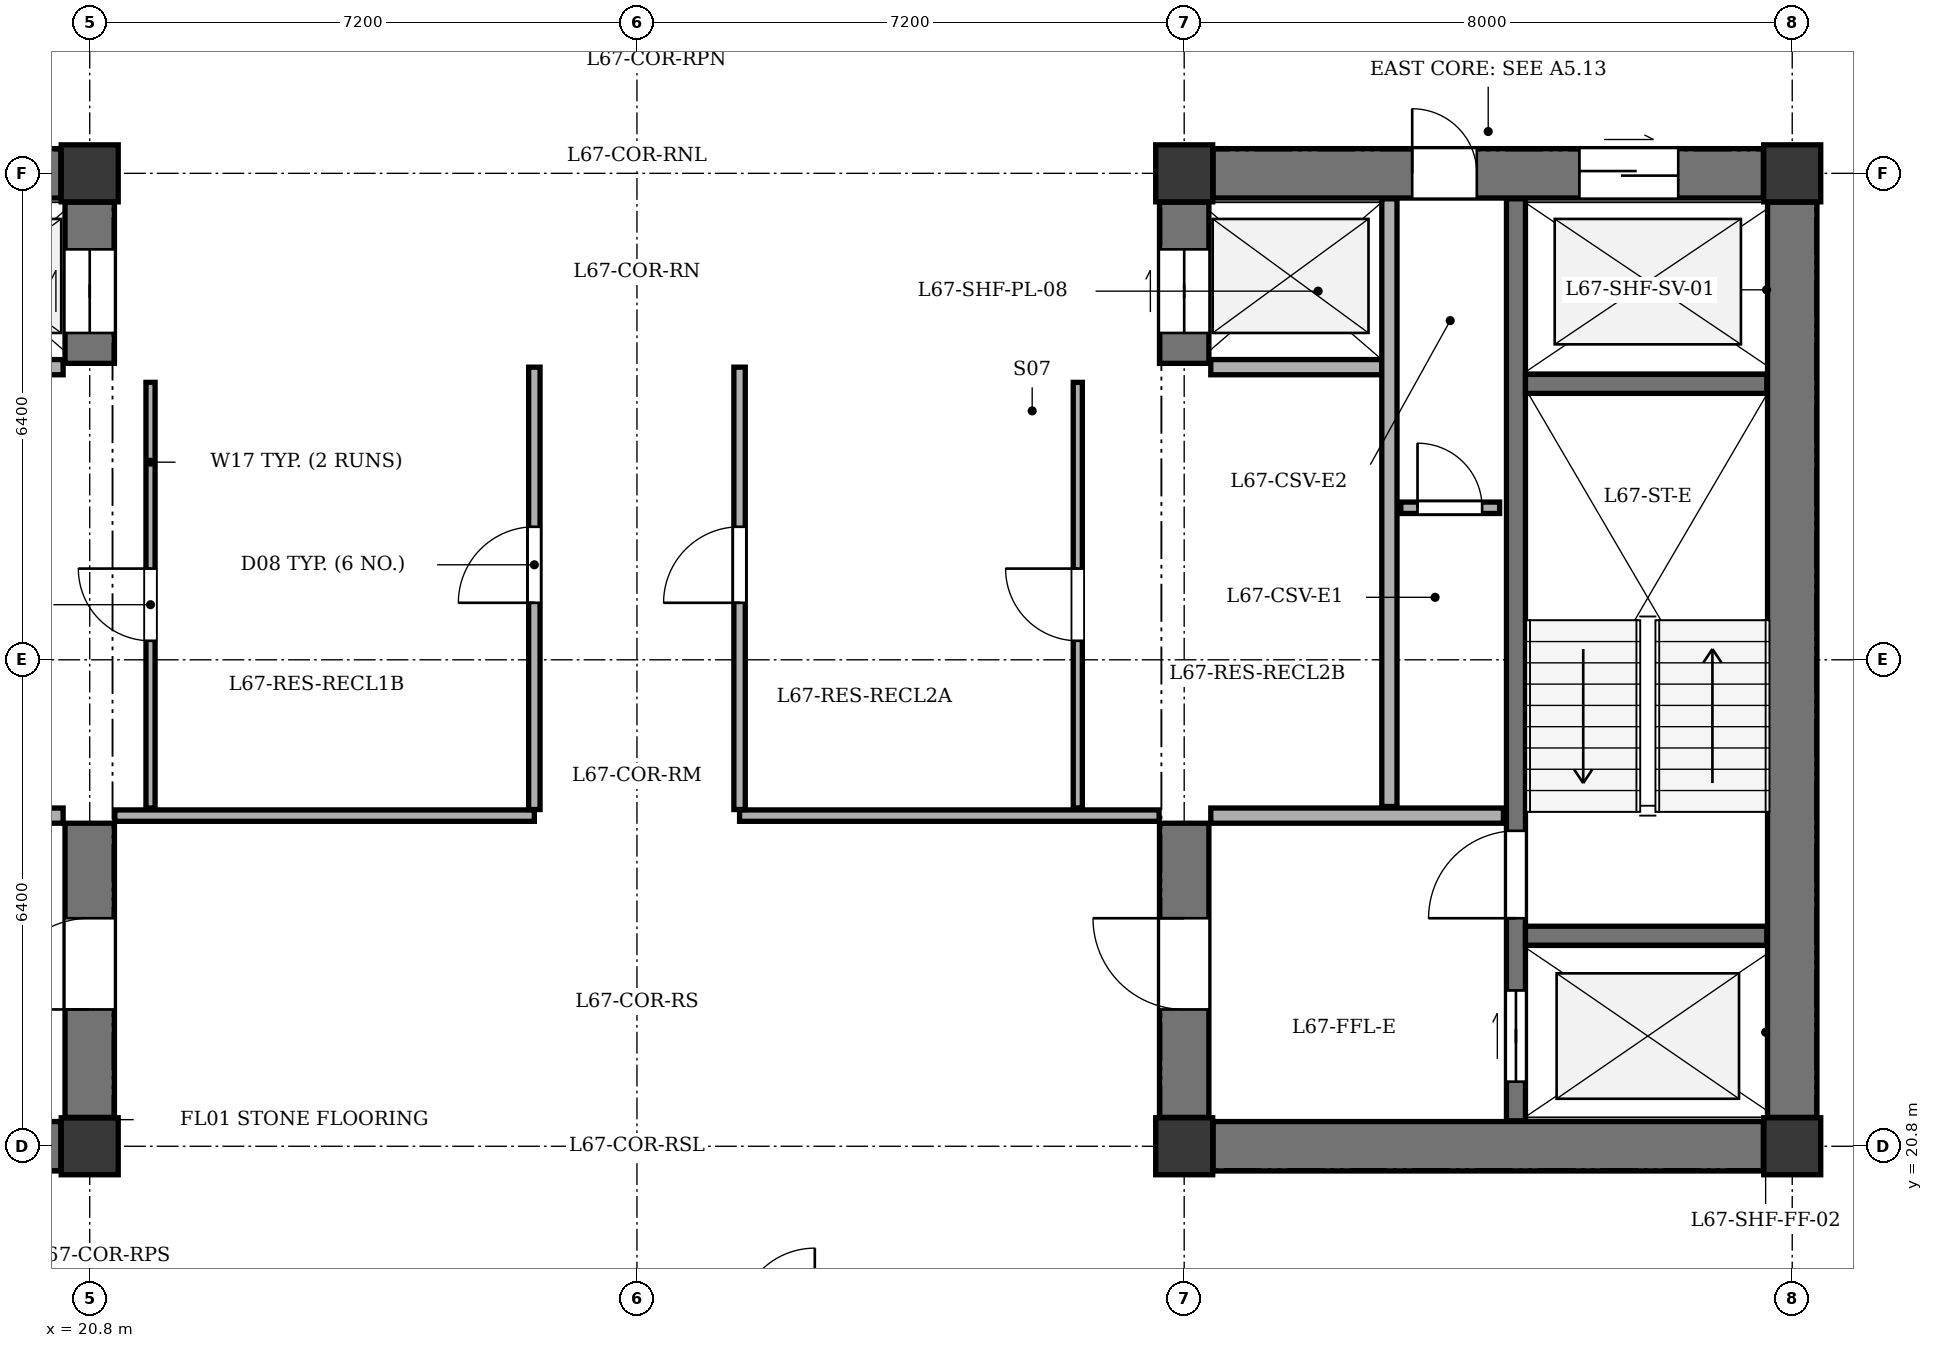
"""IFC4 building model, lengths in metres.
Left out: names, types, materials, properties, quantities, classifications, styles, units other than length and angle.
Written with IfcOpenShell. Run it as: python <this file> out.ifc"""

import sys

from ifc_helpers import new_model, si_unit, direction, frame, frame_2d, origin, origin_2d, place, context, subcontext, project, spatial, rectangle, extrude, element, fill, save


model = new_model("IFC4")
c1 = context("Model", 3, precision=1e-05, world=origin(), true_north=direction((0.0, 1.0)))
c2 = subcontext(c1, "Body", "Model", "MODEL_VIEW")
j1 = project(units=[si_unit("LENGTHUNIT", "METRE"), si_unit("PLANEANGLEUNIT", "RADIAN")], contexts=[c1])
p1 = place(None, origin())
s1 = spatial("IfcSite", under=j1, at=p1, CompositionType="ELEMENT")
p2 = place(p1, origin())
s2 = spatial("IfcBuilding", under=s1, at=p2, CompositionType="ELEMENT")
p3 = place(p2, frame((0.0, 0.0, 255.1)))
s3 = spatial("IfcBuildingStorey", under=s2, at=p3, CompositionType="ELEMENT", Elevation=255.1)
for number, where, z_axis, x_axis in (
    (1, (20.8, 20.8, 0.0), (0.0, 0.0, 1.0), (1.0, 0.0, 0.0)),
    (2, (20.8, 33.6, 0.0), (0.0, 0.0, 1.0), (1.0, 0.0, 0.0)),
    (3, (35.2, 20.8, 0.0), (0.0, 0.0, 1.0), (1.0, 0.0, 0.0)),
    (4, (43.2, 20.8, 0.0), (0.0, 0.0, 1.0), (1.0, 0.0, 0.0)),
    (5, (35.2, 33.6, 0.0), (0.0, 0.0, 1.0), (1.0, 0.0, 0.0)),
    (6, (43.2, 33.6, 0.0), (0.0, 0.0, 1.0), (1.0, 0.0, 0.0)),
):
    element("IfcColumn", number, at=place(p3, frame(where, z_axis=z_axis, x_axis=x_axis)), inside=s3, PredefinedType="COLUMN", context=c2, shape_type="SweptSolid", body=[
        extrude(rectangle(XDim=0.75, YDim=0.75, at=origin_2d()), origin(), (0.0, 0.0, 1.0), 3.4),
    ])
p4 = place(p3, frame((13.18, 20.8, 0.0), z_axis=(0.0, 0.0, 1.0), x_axis=(1.0, 0.0, 0.0)))
e7 = element("IfcWall", 7, at=p4, inside=s3, PredefinedType="SHEAR", context=c2, shape_type="SweptSolid", body=[
    extrude(rectangle(XDim=7.24, YDim=0.65, at=frame_2d((3.62, 0.0))), origin(), (0.0, 0.0, 1.0), 3.1),
])
p5 = place(p3, frame((13.18, 33.6, 0.0), z_axis=(0.0, 0.0, 1.0), x_axis=(1.0, 0.0, 0.0)))
e8 = element("IfcWall", 8, at=p5, inside=s3, PredefinedType="SHEAR", context=c2, shape_type="SweptSolid", body=[
    extrude(rectangle(XDim=7.24, YDim=0.65, at=frame_2d((3.62, 0.0))), origin(), (0.0, 0.0, 1.0), 3.1),
])
p6 = place(p5, frame((2.19, 0.0, 0.0)))
e9 = element("IfcOpeningElement", 9, at=p6, cuts=e8, PredefinedType="OPENING", context=c2, shape_type="SweptSolid", body=[
    extrude(rectangle(XDim=0.85, YDim=2.02, at=frame_2d((0.425, 1.01))), frame((0.0, 0.335, 0.0), z_axis=(0.0, -1.0, 0.0), x_axis=(1.0, 0.0, 0.0)), (0.0, 0.0, 1.0), 0.67),
])
p7 = place(p3, frame((20.8, 21.18, 0.0), z_axis=(0.0, 0.0, 1.0), x_axis=(0.0, 1.0, 0.0)))
e10 = element("IfcWall", 10, at=p7, inside=s3, PredefinedType="SHEAR", context=c2, shape_type="SweptSolid", body=[
    extrude(rectangle(XDim=3.87, YDim=0.65, at=frame_2d((1.935, 0.0))), origin(), (0.0, 0.0, 1.0), 3.1),
])
p8 = place(p7, frame((1.42, 0.0, 0.0)))
e11 = element("IfcOpeningElement", 11, at=p8, cuts=e10, PredefinedType="OPENING", context=c2, shape_type="SweptSolid", body=[
    extrude(rectangle(XDim=1.2, YDim=2.15, at=frame_2d((0.6, 1.075))), frame((0.0, 0.335, 0.0), z_axis=(0.0, -1.0, 0.0), x_axis=(1.0, 0.0, 0.0)), (0.0, 0.0, 1.0), 0.67),
])
p9 = place(p3, frame((20.8, 31.1, 0.0), z_axis=(0.0, 0.0, 1.0), x_axis=(0.0, 1.0, 0.0)))
e12 = element("IfcWall", 12, at=p9, inside=s3, PredefinedType="SHEAR", context=c2, shape_type="SweptSolid", body=[
    extrude(rectangle(XDim=2.12, YDim=0.65, at=frame_2d((1.06, 0.0))), origin(), (0.0, 0.0, 1.0), 3.1),
])
p10 = place(p9, frame((0.4, 0.0, 0.0)))
e13 = element("IfcOpeningElement", 13, at=p10, cuts=e12, PredefinedType="OPENING", context=c2, shape_type="SweptSolid", body=[
    extrude(rectangle(XDim=1.1, YDim=2.1, at=frame_2d((0.55, 1.05))), frame((0.0, 0.335, 0.0), z_axis=(0.0, -1.0, 0.0), x_axis=(1.0, 0.0, 0.0)), (0.0, 0.0, 1.0), 0.67),
])
for number, where, z_axis, x_axis in (
    (14, (16.6, 25.15, 0.0), (0.0, 0.0, 1.0), (1.0, 0.0, 0.0)),
    (15, (16.6, 31.05, 0.0), (0.0, 0.0, 1.0), (1.0, 0.0, 0.0)),
):
    element("IfcWall", number, at=place(p3, frame(where, z_axis=z_axis, x_axis=x_axis)), inside=s3, PredefinedType="SOLIDWALL", context=c2, shape_type="SweptSolid", body=[
        extrude(rectangle(XDim=3.85, YDim=0.2, at=frame_2d((1.925, 0.0))), origin(), (0.0, 0.0, 1.0), 3.1),
    ])
p11 = place(p3, frame((43.2, 21.18, 0.0), z_axis=(0.0, 0.0, 1.0), x_axis=(0.0, 1.0, 0.0)))
e16 = element("IfcWall", 16, at=p11, inside=s3, PredefinedType="SHEAR", context=c2, shape_type="SweptSolid", body=[
    extrude(rectangle(XDim=12.04, YDim=0.65, at=frame_2d((6.02, 0.0))), origin(), (0.0, 0.0, 1.0), 3.1),
])
p12 = place(p3, frame((35.58, 20.8, 0.0), z_axis=(0.0, 0.0, 1.0), x_axis=(1.0, 0.0, 0.0)))
e17 = element("IfcWall", 17, at=p12, inside=s3, PredefinedType="SHEAR", context=c2, shape_type="SweptSolid", body=[
    extrude(rectangle(XDim=7.24, YDim=0.65, at=frame_2d((3.62, 0.0))), origin(), (0.0, 0.0, 1.0), 3.1),
])
p13 = place(p3, frame((35.58, 33.6, 0.0), z_axis=(0.0, 0.0, 1.0), x_axis=(1.0, 0.0, 0.0)))
e18 = element("IfcWall", 18, at=p13, inside=s3, PredefinedType="SHEAR", context=c2, shape_type="SweptSolid", body=[
    extrude(rectangle(XDim=7.24, YDim=0.65, at=frame_2d((3.62, 0.0))), origin(), (0.0, 0.0, 1.0), 3.1),
])
p14 = place(p13, frame((4.82, 0.0, 0.0)))
e19 = element("IfcOpeningElement", 19, at=p14, cuts=e18, PredefinedType="OPENING", context=c2, shape_type="SweptSolid", body=[
    extrude(rectangle(XDim=1.3, YDim=2.15, at=frame_2d((0.65, 1.075))), frame((0.0, 0.335, 0.0), z_axis=(0.0, -1.0, 0.0), x_axis=(1.0, 0.0, 0.0)), (0.0, 0.0, 1.0), 0.67),
])
p15 = place(p13, frame((2.62, 0.0, 0.0)))
e20 = element("IfcOpeningElement", 20, at=p15, cuts=e18, PredefinedType="OPENING", context=c2, shape_type="SweptSolid", body=[
    extrude(rectangle(XDim=0.85, YDim=2.02, at=frame_2d((0.425, 1.01))), frame((0.0, 0.335, 0.0), z_axis=(0.0, -1.0, 0.0), x_axis=(1.0, 0.0, 0.0)), (0.0, 0.0, 1.0), 0.67),
])
p16 = place(p3, frame((35.2, 21.18, 0.0), z_axis=(0.0, 0.0, 1.0), x_axis=(0.0, 1.0, 0.0)))
e21 = element("IfcWall", 21, at=p16, inside=s3, PredefinedType="SHEAR", context=c2, shape_type="SweptSolid", body=[
    extrude(rectangle(XDim=3.87, YDim=0.65, at=frame_2d((1.935, 0.0))), origin(), (0.0, 0.0, 1.0), 3.1),
])
p17 = place(p16, frame((1.42, 0.0, 0.0)))
e22 = element("IfcOpeningElement", 22, at=p17, cuts=e21, PredefinedType="OPENING", context=c2, shape_type="SweptSolid", body=[
    extrude(rectangle(XDim=1.2, YDim=2.15, at=frame_2d((0.6, 1.075))), frame((0.0, 0.335, 0.0), z_axis=(0.0, -1.0, 0.0), x_axis=(1.0, 0.0, 0.0)), (0.0, 0.0, 1.0), 0.67),
])
p18 = place(p3, frame((35.2, 31.1, 0.0), z_axis=(0.0, 0.0, 1.0), x_axis=(0.0, 1.0, 0.0)))
e23 = element("IfcWall", 23, at=p18, inside=s3, PredefinedType="SHEAR", context=c2, shape_type="SweptSolid", body=[
    extrude(rectangle(XDim=2.12, YDim=0.65, at=frame_2d((1.06, 0.0))), origin(), (0.0, 0.0, 1.0), 3.1),
])
p19 = place(p18, frame((0.4, 0.0, 0.0)))
e24 = element("IfcOpeningElement", 24, at=p19, cuts=e23, PredefinedType="OPENING", context=c2, shape_type="SweptSolid", body=[
    extrude(rectangle(XDim=1.1, YDim=2.1, at=frame_2d((0.55, 1.05))), frame((0.0, 0.335, 0.0), z_axis=(0.0, -1.0, 0.0), x_axis=(1.0, 0.0, 0.0)), (0.0, 0.0, 1.0), 0.67),
])
p20 = place(p3, frame((39.565, 21.135, 0.0), z_axis=(0.0, 0.0, 1.0), x_axis=(0.0, 1.0, 0.0)))
e25 = element("IfcWall", 25, at=p20, inside=s3, PredefinedType="SHEAR", context=c2, shape_type="SweptSolid", body=[
    extrude(rectangle(XDim=12.13, YDim=0.25, at=frame_2d((6.065, 0.0))), origin(), (0.0, 0.0, 1.0), 3.1),
])
p21 = place(p20, frame((0.515, 0.0, 0.0)))
e26 = element("IfcOpeningElement", 26, at=p21, cuts=e25, PredefinedType="OPENING", context=c2, shape_type="SweptSolid", body=[
    extrude(rectangle(XDim=1.2, YDim=2.15, at=frame_2d((0.6, 1.075))), frame((0.0, 0.135, 0.0), z_axis=(0.0, -1.0, 0.0), x_axis=(1.0, 0.0, 0.0)), (0.0, 0.0, 1.0), 0.27),
])
p22 = place(p20, frame((2.665, 0.0, 0.0)))
e27 = element("IfcOpeningElement", 27, at=p22, cuts=e25, PredefinedType="OPENING", context=c2, shape_type="SweptSolid", body=[
    extrude(rectangle(XDim=1.15, YDim=2.15, at=frame_2d((0.575, 1.075))), frame((0.0, 0.135, 0.0), z_axis=(0.0, -1.0, 0.0), x_axis=(1.0, 0.0, 0.0)), (0.0, 0.0, 1.0), 0.27),
])
for number, where, z_axis, x_axis in (
    (28, (39.69, 23.57, 0.0), (0.0, 0.0, 1.0), (1.0, 0.0, 0.0)),
    (29, (39.69, 30.83, 0.0), (0.0, 0.0, 1.0), (1.0, 0.0, 0.0)),
):
    element("IfcWall", number, at=place(p3, frame(where, z_axis=z_axis, x_axis=x_axis)), inside=s3, PredefinedType="SHEAR", context=c2, shape_type="SweptSolid", body=[
        extrude(rectangle(XDim=3.175, YDim=0.25, at=frame_2d((1.587, 0.0))), origin(), (0.0, 0.0, 1.0), 3.1),
    ])
p23 = place(p3, frame((35.55, 25.15, 0.0), z_axis=(0.0, 0.0, 1.0), x_axis=(1.0, 0.0, 0.0)))
e30 = element("IfcWall", 30, at=p23, inside=s3, PredefinedType="SOLIDWALL", context=c2, shape_type="SweptSolid", body=[
    extrude(rectangle(XDim=3.85, YDim=0.2, at=frame_2d((1.925, 0.0))), origin(), (0.0, 0.0, 1.0), 3.1),
])
p24 = place(p3, frame((35.55, 31.05, 0.0), z_axis=(0.0, 0.0, 1.0), x_axis=(1.0, 0.0, 0.0)))
e31 = element("IfcWall", 31, at=p24, inside=s3, PredefinedType="SOLIDWALL", context=c2, shape_type="SweptSolid", body=[
    extrude(rectangle(XDim=2.25, YDim=0.2, at=frame_2d((1.125, 0.0))), origin(), (0.0, 0.0, 1.0), 3.1),
])
p25 = place(p3, frame((37.9, 25.27, 0.0), z_axis=(0.0, 0.0, 1.0), x_axis=(0.0, 1.0, 0.0)))
e32 = element("IfcWall", 32, at=p25, inside=s3, PredefinedType="SOLIDWALL", context=c2, shape_type="SweptSolid", body=[
    extrude(rectangle(XDim=7.995, YDim=0.2, at=frame_2d((3.998, 0.0))), origin(), (0.0, 0.0, 1.0), 3.1),
])
p26 = place(p3, frame((38.05, 29.2, 0.0), z_axis=(0.0, 0.0, 1.0), x_axis=(1.0, 0.0, 0.0)))
e33 = element("IfcWall", 33, at=p26, inside=s3, PredefinedType="PARTITIONING", context=c2, shape_type="SweptSolid", body=[
    extrude(rectangle(XDim=1.3, YDim=0.15, at=frame_2d((0.65, 0.0))), origin(), (0.0, 0.0, 1.0), 3.1),
])
p27 = place(p26, frame((0.22, 0.0, 0.0)))
e34 = element("IfcOpeningElement", 34, at=p27, cuts=e33, PredefinedType="OPENING", context=c2, shape_type="SweptSolid", body=[
    extrude(rectangle(XDim=0.85, YDim=2.02, at=frame_2d((0.425, 1.01))), frame((0.0, 0.085, 0.0), z_axis=(0.0, -1.0, 0.0), x_axis=(1.0, 0.0, 0.0)), (0.0, 0.0, 1.0), 0.17),
])
for number, where, z_axis, x_axis in (
    (35, (21.13, 25.15, 0.0), (0.0, 0.0, 1.0), (1.0, 0.0, 0.0)),
    (36, (29.35, 25.15, 0.0), (0.0, 0.0, 1.0), (1.0, 0.0, 0.0)),
):
    element("IfcWall", number, at=place(p3, frame(where, z_axis=z_axis, x_axis=x_axis)), inside=s3, PredefinedType="PARTITIONING", context=c2, shape_type="SweptSolid", body=[
        extrude(rectangle(XDim=5.52, YDim=0.15, at=frame_2d((2.76, 0.0))), origin(), (0.0, 0.0, 1.0), 3.1),
    ])
p28 = place(p3, frame((26.65, 25.23, 0.0), z_axis=(0.0, 0.0, 1.0), x_axis=(0.0, 1.0, 0.0)))
e37 = element("IfcWall", 37, at=p28, inside=s3, PredefinedType="PARTITIONING", context=c2, shape_type="SweptSolid", body=[
    extrude(rectangle(XDim=5.82, YDim=0.15, at=frame_2d((2.91, 0.0))), origin(), (0.0, 0.0, 1.0), 3.1),
])
p29 = place(p28, frame((2.72, 0.0, 0.0)))
e38 = element("IfcOpeningElement", 38, at=p29, cuts=e37, PredefinedType="OPENING", context=c2, shape_type="SweptSolid", body=[
    extrude(rectangle(XDim=1.0, YDim=2.1, at=frame_2d((0.5, 1.05))), frame((0.0, 0.085, 0.0), z_axis=(0.0, -1.0, 0.0), x_axis=(1.0, 0.0, 0.0)), (0.0, 0.0, 1.0), 0.17),
])
p30 = place(p3, frame((21.6, 25.25, 0.0), z_axis=(0.0, 0.0, 1.0), x_axis=(0.0, 1.0, 0.0)))
e39 = element("IfcWall", 39, at=p30, inside=s3, PredefinedType="PARTITIONING", context=c2, shape_type="SweptSolid", body=[
    extrude(rectangle(XDim=5.6, YDim=0.12, at=frame_2d((2.8, 0.0))), origin(), (0.0, 0.0, 1.0), 3.1),
])
p31 = place(p30, frame((2.2, 0.0, 0.0)))
e40 = element("IfcOpeningElement", 40, at=p31, cuts=e39, PredefinedType="OPENING", context=c2, shape_type="SweptSolid", body=[
    extrude(rectangle(XDim=0.95, YDim=2.1, at=frame_2d((0.475, 1.05))), frame((0.0, 0.07, 0.0), z_axis=(0.0, -1.0, 0.0), x_axis=(1.0, 0.0, 0.0)), (0.0, 0.0, 1.0), 0.14),
])
p32 = place(p3, frame((29.35, 25.23, 0.0), z_axis=(0.0, 0.0, 1.0), x_axis=(0.0, 1.0, 0.0)))
e41 = element("IfcWall", 41, at=p32, inside=s3, PredefinedType="PARTITIONING", context=c2, shape_type="SweptSolid", body=[
    extrude(rectangle(XDim=5.82, YDim=0.15, at=frame_2d((2.91, 0.0))), origin(), (0.0, 0.0, 1.0), 3.1),
])
p33 = place(p32, frame((2.72, 0.0, 0.0)))
e42 = element("IfcOpeningElement", 42, at=p33, cuts=e41, PredefinedType="OPENING", context=c2, shape_type="SweptSolid", body=[
    extrude(rectangle(XDim=1.0, YDim=2.1, at=frame_2d((0.5, 1.05))), frame((0.0, 0.085, 0.0), z_axis=(0.0, -1.0, 0.0), x_axis=(1.0, 0.0, 0.0)), (0.0, 0.0, 1.0), 0.17),
])
p34 = place(p3, frame((33.8, 25.25, 0.0), z_axis=(0.0, 0.0, 1.0), x_axis=(0.0, 1.0, 0.0)))
e43 = element("IfcWall", 43, at=p34, inside=s3, PredefinedType="PARTITIONING", context=c2, shape_type="SweptSolid", body=[
    extrude(rectangle(XDim=5.6, YDim=0.12, at=frame_2d((2.8, 0.0))), origin(), (0.0, 0.0, 1.0), 3.1),
])
p35 = place(p34, frame((2.2, 0.0, 0.0)))
e44 = element("IfcOpeningElement", 44, at=p35, cuts=e43, PredefinedType="OPENING", context=c2, shape_type="SweptSolid", body=[
    extrude(rectangle(XDim=0.95, YDim=2.1, at=frame_2d((0.475, 1.05))), frame((0.0, 0.07, 0.0), z_axis=(0.0, -1.0, 0.0), x_axis=(1.0, 0.0, 0.0)), (0.0, 0.0, 1.0), 0.14),
])
p36 = place(p8, origin())
e45 = element("IfcDoor", 45, at=p36, inside=s3, OperationType="SINGLE_SWING_LEFT", PredefinedType="DOOR", context=c2, shape_type="SweptSolid", body=[
    extrude(rectangle(XDim=1.2, YDim=2.15, at=frame_2d((0.6, 1.075))), frame((0.0, 0.025, 0.0), z_axis=(0.0, -1.0, 0.0), x_axis=(1.0, 0.0, 0.0)), (0.0, 0.0, 1.0), 0.05),
])
fill(e11, e45)
p37 = place(p10, origin())
e46 = element("IfcDoor", 46, at=p37, inside=s3, OperationType="DOUBLE_DOOR_SLIDING", PredefinedType="DOOR", context=c2, shape_type="SweptSolid", body=[
    extrude(rectangle(XDim=1.1, YDim=2.1, at=frame_2d((0.55, 1.05))), frame((0.0, 0.025, 0.0), z_axis=(0.0, -1.0, 0.0), x_axis=(1.0, 0.0, 0.0)), (0.0, 0.0, 1.0), 0.05),
])
fill(e13, e46)
p38 = place(p14, origin())
e47 = element("IfcDoor", 47, at=p38, inside=s3, OperationType="DOUBLE_DOOR_SLIDING", PredefinedType="DOOR", context=c2, shape_type="SweptSolid", body=[
    extrude(rectangle(XDim=1.3, YDim=2.15, at=frame_2d((0.65, 1.075))), frame((0.0, 0.025, 0.0), z_axis=(0.0, -1.0, 0.0), x_axis=(1.0, 0.0, 0.0)), (0.0, 0.0, 1.0), 0.05),
])
fill(e19, e47)
p39 = place(p15, origin())
e48 = element("IfcDoor", 48, at=p39, inside=s3, OperationType="SINGLE_SWING_LEFT", PredefinedType="DOOR", context=c2, shape_type="SweptSolid", body=[
    extrude(rectangle(XDim=0.85, YDim=2.02, at=frame_2d((0.425, 1.01))), frame((0.0, 0.025, 0.0), z_axis=(0.0, -1.0, 0.0), x_axis=(1.0, 0.0, 0.0)), (0.0, 0.0, 1.0), 0.05),
])
fill(e20, e48)
p40 = place(p17, origin())
e49 = element("IfcDoor", 49, at=p40, inside=s3, OperationType="SINGLE_SWING_RIGHT", PredefinedType="DOOR", context=c2, shape_type="SweptSolid", body=[
    extrude(rectangle(XDim=1.2, YDim=2.15, at=frame_2d((0.6, 1.075))), frame((0.0, 0.025, 0.0), z_axis=(0.0, -1.0, 0.0), x_axis=(1.0, 0.0, 0.0)), (0.0, 0.0, 1.0), 0.05),
])
fill(e22, e49)
p41 = place(p19, origin())
e50 = element("IfcDoor", 50, at=p41, inside=s3, OperationType="DOUBLE_DOOR_SLIDING", PredefinedType="DOOR", context=c2, shape_type="SweptSolid", body=[
    extrude(rectangle(XDim=1.1, YDim=2.1, at=frame_2d((0.55, 1.05))), frame((0.0, 0.025, 0.0), z_axis=(0.0, -1.0, 0.0), x_axis=(1.0, 0.0, 0.0)), (0.0, 0.0, 1.0), 0.05),
])
fill(e24, e50)
p42 = place(p21, origin())
e51 = element("IfcDoor", 51, at=p42, inside=s3, OperationType="DOUBLE_DOOR_SLIDING", PredefinedType="DOOR", context=c2, shape_type="SweptSolid", body=[
    extrude(rectangle(XDim=1.2, YDim=2.15, at=frame_2d((0.6, 1.075))), frame((0.0, 0.025, 0.0), z_axis=(0.0, -1.0, 0.0), x_axis=(1.0, 0.0, 0.0)), (0.0, 0.0, 1.0), 0.05),
])
fill(e26, e51)
p43 = place(p22, origin())
e52 = element("IfcDoor", 52, at=p43, inside=s3, OperationType="SINGLE_SWING_LEFT", PredefinedType="DOOR", context=c2, shape_type="SweptSolid", body=[
    extrude(rectangle(XDim=1.15, YDim=2.15, at=frame_2d((0.575, 1.075))), frame((0.0, 0.025, 0.0), z_axis=(0.0, -1.0, 0.0), x_axis=(1.0, 0.0, 0.0)), (0.0, 0.0, 1.0), 0.05),
])
fill(e27, e52)
p44 = place(p27, origin())
e53 = element("IfcDoor", 53, at=p44, inside=s3, OperationType="SINGLE_SWING_LEFT", PredefinedType="DOOR", context=c2, shape_type="SweptSolid", body=[
    extrude(rectangle(XDim=0.85, YDim=2.02, at=frame_2d((0.425, 1.01))), frame((0.0, 0.025, 0.0), z_axis=(0.0, -1.0, 0.0), x_axis=(1.0, 0.0, 0.0)), (0.0, 0.0, 1.0), 0.05),
])
fill(e34, e53)
p45 = place(p31, origin())
e54 = element("IfcDoor", 54, at=p45, inside=s3, OperationType="SINGLE_SWING_RIGHT", PredefinedType="DOOR", context=c2, shape_type="SweptSolid", body=[
    extrude(rectangle(XDim=0.95, YDim=2.1, at=frame_2d((0.475, 1.05))), frame((0.0, 0.025, 0.0), z_axis=(0.0, -1.0, 0.0), x_axis=(1.0, 0.0, 0.0)), (0.0, 0.0, 1.0), 0.05),
])
fill(e40, e54)
p46 = place(p29, origin())
e55 = element("IfcDoor", 55, at=p46, inside=s3, OperationType="SINGLE_SWING_LEFT", PredefinedType="DOOR", context=c2, shape_type="SweptSolid", body=[
    extrude(rectangle(XDim=1.0, YDim=2.1, at=frame_2d((0.5, 1.05))), frame((0.0, 0.025, 0.0), z_axis=(0.0, -1.0, 0.0), x_axis=(1.0, 0.0, 0.0)), (0.0, 0.0, 1.0), 0.05),
])
fill(e38, e55)
p47 = place(p35, origin())
e56 = element("IfcDoor", 56, at=p47, inside=s3, OperationType="SINGLE_SWING_RIGHT", PredefinedType="DOOR", context=c2, shape_type="SweptSolid", body=[
    extrude(rectangle(XDim=0.95, YDim=2.1, at=frame_2d((0.475, 1.05))), frame((0.0, 0.025, 0.0), z_axis=(0.0, -1.0, 0.0), x_axis=(1.0, 0.0, 0.0)), (0.0, 0.0, 1.0), 0.05),
])
fill(e44, e56)
p48 = place(p33, origin())
e57 = element("IfcDoor", 57, at=p48, inside=s3, OperationType="SINGLE_SWING_LEFT", PredefinedType="DOOR", context=c2, shape_type="SweptSolid", body=[
    extrude(rectangle(XDim=1.0, YDim=2.1, at=frame_2d((0.5, 1.05))), frame((0.0, 0.025, 0.0), z_axis=(0.0, -1.0, 0.0), x_axis=(1.0, 0.0, 0.0)), (0.0, 0.0, 1.0), 0.05),
])
fill(e42, e57)
save(model, sys.argv[1])
